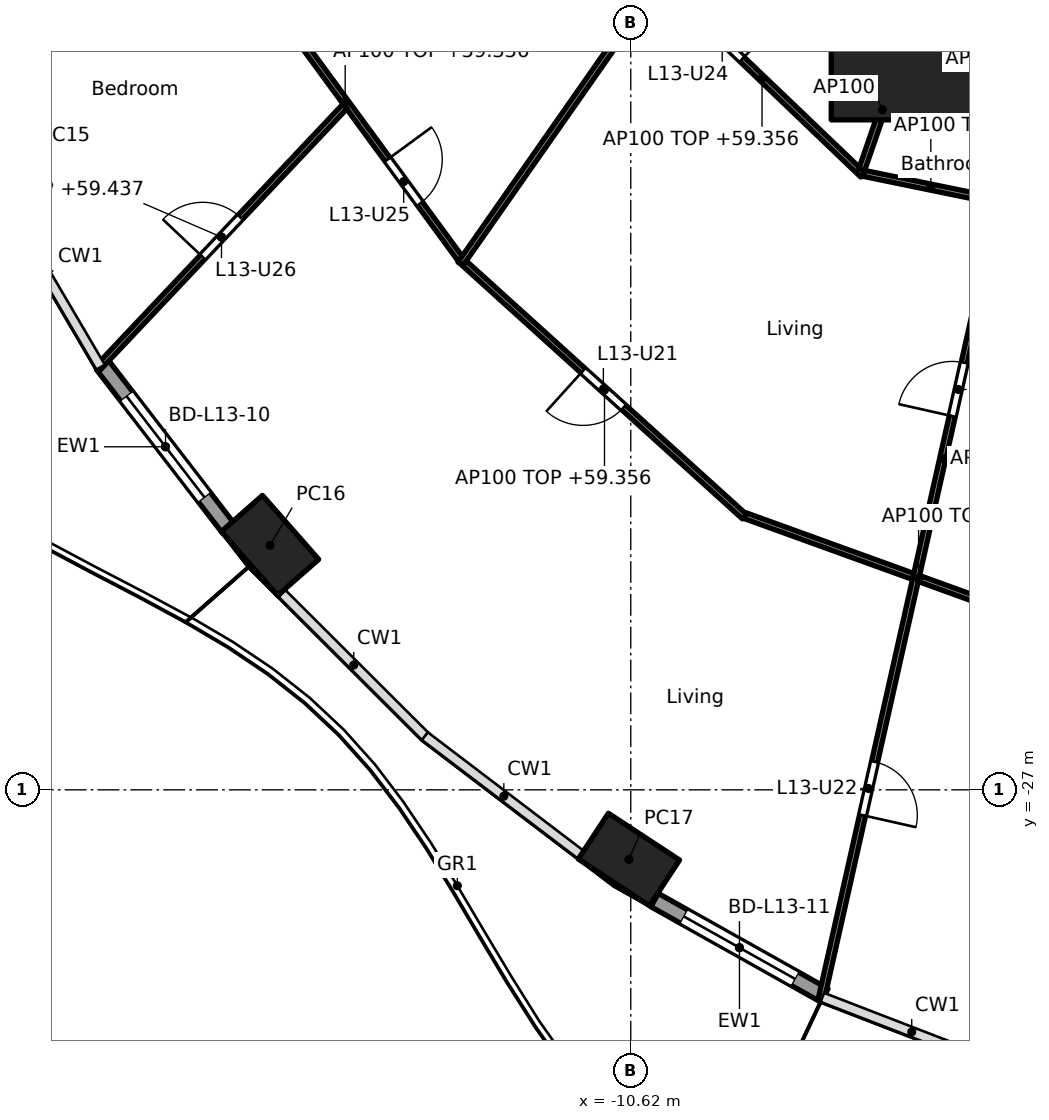
"""IFC4 building model, lengths in metres.
Left out: names, types, materials, properties, quantities, classifications, styles, units other than length and angle.
Written with IfcOpenShell. Run it as: python <this file> out.ifc"""

import sys

from ifc_helpers import new_model, si_unit, direction, frame, frame_2d, origin, origin_2d, place, context, subcontext, project, spatial, rectangle, hollow_rectangle, extrude, element, fill, save


model = new_model("IFC4")
c1 = context("Model", 3, precision=1e-05, world=origin(), true_north=direction((0.0, 1.0)))
c2 = subcontext(c1, "Body", "Model", "MODEL_VIEW")
j1 = project(units=[si_unit("LENGTHUNIT", "METRE"), si_unit("PLANEANGLEUNIT", "RADIAN")], contexts=[c1])
p1 = place(None, origin())
s1 = spatial("IfcSite", under=j1, at=p1, CompositionType="ELEMENT")
p2 = place(p1, origin())
s2 = spatial("IfcBuilding", under=s1, at=p2, CompositionType="ELEMENT")
p3 = place(p2, frame((0.0, 0.0, 56.6)))
s3 = spatial("IfcBuildingStorey", under=s2, at=p3, CompositionType="ELEMENT", Elevation=56.6)
for number, where, z_axis, x_axis in (
    (1, (-16.552, -22.981, 0.0), (0.0, 0.0, 1.0), (0.66, -0.751, 0.0)),
    (2, (-10.65, -28.146, 0.0), (0.0, 0.0, 1.0), (0.836, -0.549, 0.0)),
):
    element("IfcColumn", number, at=place(p3, frame(where, z_axis=z_axis, x_axis=x_axis)), inside=s3, PredefinedType="COLUMN", context=c2, shape_type="SweptSolid", body=[
        extrude(hollow_rectangle(XDim=1.4, YDim=0.9, WallThickness=0.05, at=origin_2d()), origin(), (0.0, 0.0, 1.0), 3.7),
    ])
p4 = place(p3, frame((-6.123, -14.782, 0.0), z_axis=(0.0, 0.0, 1.0), x_axis=(1.0, 0.0, 0.0)))
e3 = element("IfcColumn", 3, at=p4, inside=s3, PredefinedType="COLUMN", context=c2, shape_type="SweptSolid", body=[
    extrude(rectangle(XDim=2.4, YDim=2.4, at=origin_2d()), origin(), (0.0, 0.0, 1.0), 3.7),
])
p5 = place(p3, frame((-17.234, -22.704, 0.0), z_axis=(0.0, 0.0, 1.0), x_axis=(-0.610457147657, 0.792049285635, 0.0)))
e4 = element("IfcWall", 4, at=p5, inside=s3, PredefinedType="SOLIDWALL", context=c2, shape_type="SweptSolid", body=[
    extrude(rectangle(XDim=3.397, YDim=0.25, at=frame_2d((1.699, 0.0))), origin(), (0.0, 0.0, 1.0), 3.44),
])
p6 = place(p5, frame((0.649, 0.0, 0.0)))
e5 = element("IfcOpeningElement", 5, at=p6, cuts=e4, PredefinedType="OPENING", context=c2, shape_type="SweptSolid", body=[
    extrude(rectangle(XDim=2.1, YDim=2.4, at=frame_2d((1.05, 1.2))), frame((0.0, 0.135, 0.0), z_axis=(0.0, -1.0, 0.0), x_axis=(1.0, 0.0, 0.0)), (0.0, 0.0, 1.0), 0.27),
])
p7 = place(p3, frame((-7.437, -30.379, 0.0), z_axis=(0.0, 0.0, 1.0), x_axis=(-0.872084295691, 0.489355679653, 0.0)))
e6 = element("IfcWall", 6, at=p7, inside=s3, PredefinedType="SOLIDWALL", context=c2, shape_type="SweptSolid", body=[
    extrude(rectangle(XDim=3.201, YDim=0.25, at=frame_2d((1.601, 0.0))), origin(), (0.0, 0.0, 1.0), 3.44),
])
p8 = place(p7, frame((0.551, 0.0, 0.0)))
e7 = element("IfcOpeningElement", 7, at=p8, cuts=e6, PredefinedType="OPENING", context=c2, shape_type="SweptSolid", body=[
    extrude(rectangle(XDim=2.1, YDim=2.4, at=frame_2d((1.05, 1.2))), frame((0.0, 0.135, 0.0), z_axis=(0.0, -1.0, 0.0), x_axis=(1.0, 0.0, 0.0)), (0.0, 0.0, 1.0), 0.27),
])
p9 = place(p3, frame((-17.211, -13.1, 0.0), z_axis=(0.0, 0.0, 1.0), x_axis=(0.591206785834, -0.806520016109, 0.0)))
e8 = element("IfcWall", 8, at=p9, inside=s3, PredefinedType="PARTITIONING", context=c2, shape_type="SweptSolid", body=[
    extrude(rectangle(XDim=6.41, YDim=0.1, at=frame_2d((3.205, 0.0))), origin(), (0.0, 0.0, 1.0), 2.756),
])
p10 = place(p9, frame((4.383, 0.0, 0.0)))
e9 = element("IfcOpeningElement", 9, at=p10, cuts=e8, PredefinedType="OPENING", context=c2, shape_type="SweptSolid", body=[
    extrude(rectangle(XDim=0.9, YDim=2.1, at=frame_2d((0.45, 1.05))), frame((0.0, 0.06, 0.0), z_axis=(0.0, -1.0, 0.0), x_axis=(1.0, 0.0, 0.0)), (0.0, 0.0, 1.0), 0.12),
])
p11 = place(p3, frame((-15.321, -15.761, 0.0), z_axis=(0.0, 0.0, 1.0), x_axis=(-0.686519245775, -0.727111631856, 0.0)))
e10 = element("IfcWall", 10, at=p11, inside=s3, PredefinedType="PARTITIONING", context=c2, shape_type="SweptSolid", body=[
    extrude(rectangle(XDim=5.912, YDim=0.1, at=frame_2d((2.956, 0.0))), origin(), (0.0, 0.0, 1.0), 2.837),
])
p12 = place(p11, frame((2.506, 0.0, 0.0)))
e11 = element("IfcOpeningElement", 11, at=p12, cuts=e10, PredefinedType="OPENING", context=c2, shape_type="SweptSolid", body=[
    extrude(rectangle(XDim=0.9, YDim=2.1, at=frame_2d((0.45, 1.05))), frame((0.0, 0.06, 0.0), z_axis=(0.0, -1.0, 0.0), x_axis=(1.0, 0.0, 0.0)), (0.0, 0.0, 1.0), 0.12),
])
p13 = place(p3, frame((-7.715, -10.193, 0.0), z_axis=(0.0, 0.0, 1.0), x_axis=(-0.573126502256, -0.819466907454, 0.0)))
e12 = element("IfcWall", 12, at=p13, inside=s3, PredefinedType="PARTITIONING", context=c2, shape_type="SweptSolid", body=[
    extrude(rectangle(XDim=9.954, YDim=0.1, at=frame_2d((4.977, 0.0))), origin(), (0.0, 0.0, 1.0), 2.687),
])
p14 = place(p3, frame((-10.119, -13.716, 0.0), z_axis=(0.0, 0.0, 1.0), x_axis=(0.722763212502, -0.69109575216, 0.0)))
e13 = element("IfcWall", 13, at=p14, inside=s3, PredefinedType="PARTITIONING", context=c2, shape_type="SweptSolid", body=[
    extrude(rectangle(XDim=4.587, YDim=0.1, at=frame_2d((2.293, 0.0))), origin(), (0.0, 0.0, 1.0), 2.756),
])
p15 = place(p14, frame((0.938, 0.0, 0.0)))
e14 = element("IfcOpeningElement", 14, at=p15, cuts=e13, PredefinedType="OPENING", context=c2, shape_type="SweptSolid", body=[
    extrude(rectangle(XDim=0.9, YDim=2.1, at=frame_2d((0.45, 1.05))), frame((0.0, 0.06, 0.0), z_axis=(0.0, -1.0, 0.0), x_axis=(1.0, 0.0, 0.0)), (0.0, 0.0, 1.0), 0.12),
])
p16 = place(p3, frame((-13.355, -18.343, 0.0), z_axis=(0.0, 0.0, 1.0), x_axis=(0.741720189244, -0.670709445936, 0.0)))
e15 = element("IfcWall", 15, at=p16, inside=s3, PredefinedType="PARTITIONING", context=c2, shape_type="SweptSolid", body=[
    extrude(rectangle(XDim=6.209, YDim=0.1, at=frame_2d((3.104, 0.0))), origin(), (0.0, 0.0, 1.0), 2.756),
])
p17 = place(p16, frame((2.63, 0.0, 0.0)))
e16 = element("IfcOpeningElement", 16, at=p17, cuts=e15, PredefinedType="OPENING", context=c2, shape_type="SweptSolid", body=[
    extrude(rectangle(XDim=0.9, YDim=2.1, at=frame_2d((0.45, 1.05))), frame((0.0, 0.06, 0.0), z_axis=(0.0, -1.0, 0.0), x_axis=(1.0, 0.0, 0.0)), (0.0, 0.0, 1.0), 0.12),
])
p18 = place(p3, frame((-6.139, -14.83, 0.0), z_axis=(0.0, 0.0, 1.0), x_axis=(-0.327246993321, -0.944938836837, 0.0)))
e17 = element("IfcWall", 17, at=p18, inside=s3, PredefinedType="PARTITIONING", context=c2, shape_type="SweptSolid", body=[
    extrude(rectangle(XDim=2.09, YDim=0.1, at=frame_2d((1.045, 0.0))), origin(), (0.0, 0.0, 1.0), 3.44),
])
p19 = place(p3, frame((-6.791, -16.862, 0.0), z_axis=(0.0, 0.0, 1.0), x_axis=(0.979581941859, -0.201045316246, 0.0)))
e18 = element("IfcWall", 18, at=p19, inside=s3, PredefinedType="PARTITIONING", context=c2, shape_type="SweptSolid", body=[
    extrude(rectangle(XDim=2.256, YDim=0.1, at=frame_2d((1.128, 0.0))), origin(), (0.0, 0.0, 1.0), 2.756),
])
p20 = place(p3, frame((-8.739, -22.491, 0.0), z_axis=(0.0, 0.0, 1.0), x_axis=(0.940401691072, -0.340065669288, 0.0)))
e19 = element("IfcWall", 19, at=p20, inside=s3, PredefinedType="PARTITIONING", context=c2, shape_type="SweptSolid", body=[
    extrude(rectangle(XDim=6.067, YDim=0.1, at=frame_2d((3.034, 0.0))), origin(), (0.0, 0.0, 1.0), 2.756),
])
p21 = place(p3, frame((-3.492, -12.662, 0.0), z_axis=(0.0, 0.0, 1.0), x_axis=(-0.219268088006, -0.975664648115, 0.0)))
e20 = element("IfcWall", 20, at=p21, inside=s3, PredefinedType="PARTITIONING", context=c2, shape_type="SweptSolid", body=[
    extrude(rectangle(XDim=18.23, YDim=0.1, at=frame_2d((9.115, 0.0))), origin(), (0.0, 0.0, 1.0), 2.687),
])
p22 = place(p21, frame((0.35, 0.0, 0.0)))
e21 = element("IfcOpeningElement", 21, at=p22, cuts=e20, PredefinedType="OPENING", context=c2, shape_type="SweptSolid", body=[
    extrude(rectangle(XDim=0.9, YDim=2.1, at=frame_2d((0.45, 1.05))), frame((0.0, 0.06, 0.0), z_axis=(0.0, -1.0, 0.0), x_axis=(1.0, 0.0, 0.0)), (0.0, 0.0, 1.0), 0.12),
])
p23 = place(p21, frame((7.497, 0.0, 0.0)))
e22 = element("IfcOpeningElement", 22, at=p23, cuts=e20, PredefinedType="OPENING", context=c2, shape_type="SweptSolid", body=[
    extrude(rectangle(XDim=0.9, YDim=2.1, at=frame_2d((0.45, 1.05))), frame((0.0, 0.06, 0.0), z_axis=(0.0, -1.0, 0.0), x_axis=(1.0, 0.0, 0.0)), (0.0, 0.0, 1.0), 0.12),
])
p24 = place(p21, frame((14.223, 0.0, 0.0)))
e23 = element("IfcOpeningElement", 23, at=p24, cuts=e20, PredefinedType="OPENING", context=c2, shape_type="SweptSolid", body=[
    extrude(rectangle(XDim=0.9, YDim=2.1, at=frame_2d((0.45, 1.05))), frame((0.0, 0.06, 0.0), z_axis=(0.0, -1.0, 0.0), x_axis=(1.0, 0.0, 0.0)), (0.0, 0.0, 1.0), 0.12),
])
p25 = place(p6, origin())
e24 = element("IfcDoor", 24, at=p25, inside=s3, OperationType="SLIDING_TO_LEFT", PredefinedType="DOOR", context=c2, shape_type="SweptSolid", body=[
    extrude(rectangle(XDim=2.1, YDim=2.4, at=frame_2d((1.05, 1.2))), frame((0.0, 0.025, 0.0), z_axis=(0.0, -1.0, 0.0), x_axis=(1.0, 0.0, 0.0)), (0.0, 0.0, 1.0), 0.05),
])
fill(e5, e24)
p26 = place(p8, origin())
e25 = element("IfcDoor", 25, at=p26, inside=s3, OperationType="SLIDING_TO_LEFT", PredefinedType="DOOR", context=c2, shape_type="SweptSolid", body=[
    extrude(rectangle(XDim=2.1, YDim=2.4, at=frame_2d((1.05, 1.2))), frame((0.0, 0.025, 0.0), z_axis=(0.0, -1.0, 0.0), x_axis=(1.0, 0.0, 0.0)), (0.0, 0.0, 1.0), 0.05),
])
fill(e7, e25)
p27 = place(p23, frame((0.9, 0.0, 0.0), x_axis=(-1.0, 0.0, 0.0)))
e26 = element("IfcDoor", 26, at=p27, inside=s3, OperationType="SINGLE_SWING_LEFT", PredefinedType="DOOR", context=c2, shape_type="SweptSolid", body=[
    extrude(rectangle(XDim=0.9, YDim=2.1, at=frame_2d((0.45, 1.05))), frame((0.0, 0.025, 0.0), z_axis=(0.0, -1.0, 0.0), x_axis=(1.0, 0.0, 0.0)), (0.0, 0.0, 1.0), 0.05),
])
fill(e22, e26)
p28 = place(p17, frame((0.9, 0.0, 0.0), x_axis=(-1.0, 0.0, 0.0)))
e27 = element("IfcDoor", 27, at=p28, inside=s3, OperationType="SINGLE_SWING_RIGHT", PredefinedType="DOOR", context=c2, shape_type="SweptSolid", body=[
    extrude(rectangle(XDim=0.9, YDim=2.1, at=frame_2d((0.45, 1.05))), frame((0.0, 0.025, 0.0), z_axis=(0.0, -1.0, 0.0), x_axis=(1.0, 0.0, 0.0)), (0.0, 0.0, 1.0), 0.05),
])
fill(e16, e27)
p29 = place(p24, origin())
e28 = element("IfcDoor", 28, at=p29, inside=s3, OperationType="SINGLE_SWING_RIGHT", PredefinedType="DOOR", context=c2, shape_type="SweptSolid", body=[
    extrude(rectangle(XDim=0.9, YDim=2.1, at=frame_2d((0.45, 1.05))), frame((0.0, 0.025, 0.0), z_axis=(0.0, -1.0, 0.0), x_axis=(1.0, 0.0, 0.0)), (0.0, 0.0, 1.0), 0.05),
])
fill(e23, e28)
p30 = place(p15, origin())
e29 = element("IfcDoor", 29, at=p30, inside=s3, OperationType="SINGLE_SWING_RIGHT", PredefinedType="DOOR", context=c2, shape_type="SweptSolid", body=[
    extrude(rectangle(XDim=0.9, YDim=2.1, at=frame_2d((0.45, 1.05))), frame((0.0, 0.025, 0.0), z_axis=(0.0, -1.0, 0.0), x_axis=(1.0, 0.0, 0.0)), (0.0, 0.0, 1.0), 0.05),
])
fill(e14, e29)
p31 = place(p10, origin())
e30 = element("IfcDoor", 30, at=p31, inside=s3, OperationType="SINGLE_SWING_LEFT", PredefinedType="DOOR", context=c2, shape_type="SweptSolid", body=[
    extrude(rectangle(XDim=0.9, YDim=2.1, at=frame_2d((0.45, 1.05))), frame((0.0, 0.025, 0.0), z_axis=(0.0, -1.0, 0.0), x_axis=(1.0, 0.0, 0.0)), (0.0, 0.0, 1.0), 0.05),
])
fill(e9, e30)
p32 = place(p12, frame((0.9, 0.0, 0.0), x_axis=(-1.0, 0.0, 0.0)))
e31 = element("IfcDoor", 31, at=p32, inside=s3, OperationType="SINGLE_SWING_LEFT", PredefinedType="DOOR", context=c2, shape_type="SweptSolid", body=[
    extrude(rectangle(XDim=0.9, YDim=2.1, at=frame_2d((0.45, 1.05))), frame((0.0, 0.025, 0.0), z_axis=(0.0, -1.0, 0.0), x_axis=(1.0, 0.0, 0.0)), (0.0, 0.0, 1.0), 0.05),
])
fill(e11, e31)
save(model, sys.argv[1])
